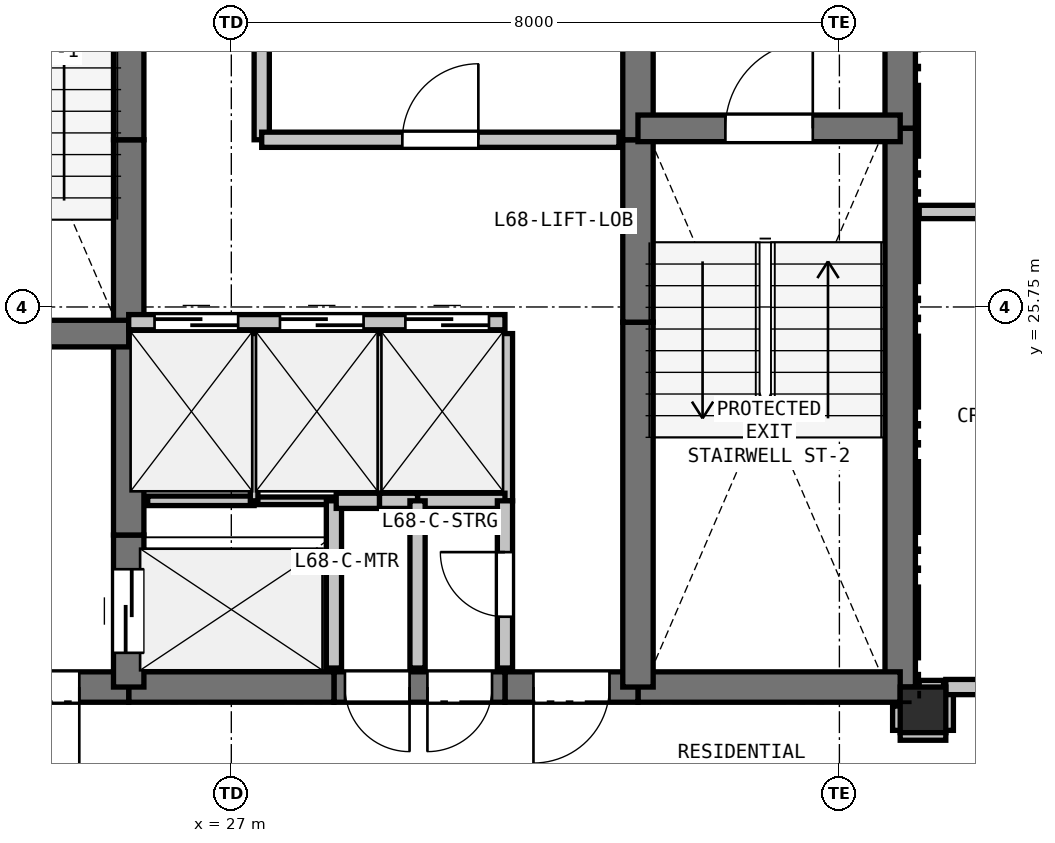
"""IFC4 building model, lengths in metres.
Left out: names, types, materials, properties, quantities, classifications, styles, units other than length and angle.
Written with IfcOpenShell. Run it as: python <this file> out.ifc"""

import sys

from ifc_helpers import new_model, si_unit, direction, frame, frame_2d, origin, origin_2d, place, context, subcontext, project, spatial, rectangle, extrude, element, fill, save


model = new_model("IFC4")
c1 = context("Model", 3, precision=1e-05, world=origin(), true_north=direction((0.0, 1.0)))
c2 = subcontext(c1, "Body", "Model", "MODEL_VIEW")
j1 = project(units=[si_unit("LENGTHUNIT", "METRE"), si_unit("PLANEANGLEUNIT", "RADIAN")], contexts=[c1])
p1 = place(None, origin())
s1 = spatial("IfcSite", under=j1, at=p1, CompositionType="ELEMENT")
p2 = place(p1, origin())
s2 = spatial("IfcBuilding", under=s1, at=p2, CompositionType="ELEMENT")
p3 = place(p2, frame((0.0, 0.0, 243.0)))
s3 = spatial("IfcBuildingStorey", under=s2, at=p3, CompositionType="ELEMENT", Elevation=243.0)
p4 = place(p3, frame((36.1, 20.45, 0.0), z_axis=(0.0, 0.0, 1.0), x_axis=(1.0, 0.0, 0.0)))
e1 = element("IfcColumn", 1, at=p4, inside=s3, PredefinedType="COLUMN", context=c2, shape_type="SweptSolid", body=[
    extrude(rectangle(XDim=0.6, YDim=0.6, at=origin_2d()), origin(), (0.0, 0.0, 1.0), 3.3),
])
p5 = place(p3, frame((35.8, 32.75, 0.0), z_axis=(0.0, 0.0, 1.0), x_axis=(0.0, -1.0, 0.0)))
e2 = element("IfcWall", 2, at=p5, inside=s3, PredefinedType="SHEAR", context=c2, shape_type="SweptSolid", body=[
    extrude(rectangle(XDim=4.65, YDim=0.4, at=frame_2d((2.325, 0.0))), origin(), (0.0, 0.0, 1.0), 3.08),
])
p6 = place(p3, frame((35.8, 28.1, 0.0), z_axis=(0.0, 0.0, 1.0), x_axis=(0.0, -1.0, 0.0)))
e3 = element("IfcWall", 3, at=p6, inside=s3, PredefinedType="SHEAR", context=c2, shape_type="SweptSolid", body=[
    extrude(rectangle(XDim=7.35, YDim=0.4, at=frame_2d((3.675, 0.0))), origin(), (0.0, 0.0, 1.0), 3.08),
])
p7 = place(p3, frame((35.8, 20.75, 0.0), z_axis=(0.0, 0.0, 1.0), x_axis=(-1.0, 0.0, 0.0)))
e4 = element("IfcWall", 4, at=p7, inside=s3, PredefinedType="SHEAR", context=c2, shape_type="SweptSolid", body=[
    extrude(rectangle(XDim=3.45, YDim=0.4, at=frame_2d((1.725, 0.0))), origin(), (0.0, 0.0, 1.0), 3.08),
])
p8 = place(p3, frame((32.35, 20.75, 0.0), z_axis=(0.0, 0.0, 1.0), x_axis=(-1.0, 0.0, 0.0)))
e5 = element("IfcWall", 5, at=p8, inside=s3, PredefinedType="SHEAR", context=c2, shape_type="SweptSolid", body=[
    extrude(rectangle(XDim=1.75, YDim=0.4, at=frame_2d((0.875, 0.0))), origin(), (0.0, 0.0, 1.0), 3.08),
])
p9 = place(p8, frame((0.375, 0.0, 0.0)))
e6 = element("IfcOpeningElement", 6, at=p9, cuts=e5, PredefinedType="OPENING", context=c2, shape_type="SweptSolid", body=[
    extrude(rectangle(XDim=1.0, YDim=2.15, at=frame_2d((0.5, 1.075))), frame((0.0, 0.21, 0.0), z_axis=(0.0, -1.0, 0.0), x_axis=(1.0, 0.0, 0.0)), (0.0, 0.0, 1.0), 0.42),
])
p10 = place(p3, frame((30.6, 20.75, 0.0), z_axis=(0.0, 0.0, 1.0), x_axis=(-1.0, 0.0, 0.0)))
e7 = element("IfcWall", 7, at=p10, inside=s3, PredefinedType="SHEAR", context=c2, shape_type="SweptSolid", body=[
    extrude(rectangle(XDim=2.25, YDim=0.4, at=frame_2d((1.125, 0.0))), origin(), (0.0, 0.0, 1.0), 3.08),
])
p11 = place(p10, frame((1.255, 0.0, 0.0)))
e8 = element("IfcOpeningElement", 8, at=p11, cuts=e7, PredefinedType="OPENING", context=c2, shape_type="SweptSolid", body=[
    extrude(rectangle(XDim=0.85, YDim=2.1, at=frame_2d((0.425, 1.05))), frame((0.0, 0.21, 0.0), z_axis=(0.0, -1.0, 0.0), x_axis=(1.0, 0.0, 0.0)), (0.0, 0.0, 1.0), 0.42),
])
p12 = place(p10, frame((0.17, 0.0, 0.0)))
e9 = element("IfcOpeningElement", 9, at=p12, cuts=e7, PredefinedType="OPENING", context=c2, shape_type="SweptSolid", body=[
    extrude(rectangle(XDim=0.85, YDim=2.1, at=frame_2d((0.425, 1.05))), frame((0.0, 0.21, 0.0), z_axis=(0.0, -1.0, 0.0), x_axis=(1.0, 0.0, 0.0)), (0.0, 0.0, 1.0), 0.42),
])
p13 = place(p3, frame((28.35, 20.75, 0.0), z_axis=(0.0, 0.0, 1.0), x_axis=(-1.0, 0.0, 0.0)))
e10 = element("IfcWall", 10, at=p13, inside=s3, PredefinedType="SHEAR", context=c2, shape_type="SweptSolid", body=[
    extrude(rectangle(XDim=2.7, YDim=0.4, at=frame_2d((1.35, 0.0))), origin(), (0.0, 0.0, 1.0), 3.08),
])
p14 = place(p3, frame((25.65, 20.75, 0.0), z_axis=(0.0, 0.0, 1.0), x_axis=(-1.0, 0.0, 0.0)))
e11 = element("IfcWall", 11, at=p14, inside=s3, PredefinedType="SHEAR", context=c2, shape_type="SweptSolid", body=[
    extrude(rectangle(XDim=3.45, YDim=0.4, at=frame_2d((1.725, 0.0))), origin(), (0.0, 0.0, 1.0), 3.08),
])
p15 = place(p14, frame((0.65, 0.0, 0.0)))
e12 = element("IfcOpeningElement", 12, at=p15, cuts=e11, PredefinedType="OPENING", context=c2, shape_type="SweptSolid", body=[
    extrude(rectangle(XDim=1.15, YDim=2.15, at=frame_2d((0.575, 1.075))), frame((0.0, 0.21, 0.0), z_axis=(0.0, -1.0, 0.0), x_axis=(1.0, 0.0, 0.0)), (0.0, 0.0, 1.0), 0.42),
])
p16 = place(p3, frame((25.65, 20.75, 0.0), z_axis=(0.0, 0.0, 1.0), x_axis=(0.0, 1.0, 0.0)))
e13 = element("IfcWall", 13, at=p16, inside=s3, PredefinedType="SHEAR", context=c2, shape_type="SweptSolid", body=[
    extrude(rectangle(XDim=2.0, YDim=0.4, at=frame_2d((1.0, 0.0))), origin(), (0.0, 0.0, 1.0), 3.08),
])
p17 = place(p16, frame((0.45, 0.0, 0.0)))
e14 = element("IfcOpeningElement", 14, at=p17, cuts=e13, PredefinedType="OPENING", context=c2, shape_type="SweptSolid", body=[
    extrude(rectangle(XDim=1.1, YDim=2.15, at=frame_2d((0.55, 1.075))), frame((0.0, 0.21, 0.0), z_axis=(0.0, -1.0, 0.0), x_axis=(1.0, 0.0, 0.0)), (0.0, 0.0, 1.0), 0.42),
])
p18 = place(p3, frame((25.65, 22.75, 0.0), z_axis=(0.0, 0.0, 1.0), x_axis=(0.0, 1.0, 0.0)))
e15 = element("IfcWall", 15, at=p18, inside=s3, PredefinedType="SHEAR", context=c2, shape_type="SweptSolid", body=[
    extrude(rectangle(XDim=2.8, YDim=0.4, at=frame_2d((1.4, 0.0))), origin(), (0.0, 0.0, 1.0), 3.08),
])
p19 = place(p3, frame((25.65, 25.55, 0.0), z_axis=(0.0, 0.0, 1.0), x_axis=(0.0, 1.0, 0.0)))
e16 = element("IfcWall", 16, at=p19, inside=s3, PredefinedType="SHEAR", context=c2, shape_type="SweptSolid", body=[
    extrude(rectangle(XDim=2.4, YDim=0.4, at=frame_2d((1.2, 0.0))), origin(), (0.0, 0.0, 1.0), 3.08),
])
for number, where, z_axis, x_axis in (
    (17, (25.65, 27.95, 0.0), (0.0, 0.0, 1.0), (0.0, 1.0, 0.0)),
    (18, (32.35, 20.75, 0.0), (0.0, 0.0, 1.0), (0.0, 1.0, 0.0)),
):
    element("IfcWall", number, at=place(p3, frame(where, z_axis=z_axis, x_axis=x_axis)), inside=s3, PredefinedType="SHEAR", context=c2, shape_type="SweptSolid", body=[
        extrude(rectangle(XDim=4.8, YDim=0.4, at=frame_2d((2.4, 0.0))), origin(), (0.0, 0.0, 1.0), 3.08),
    ])
p20 = place(p3, frame((32.35, 25.55, 0.0), z_axis=(0.0, 0.0, 1.0), x_axis=(0.0, 1.0, 0.0)))
e19 = element("IfcWall", 19, at=p20, inside=s3, PredefinedType="SHEAR", context=c2, shape_type="SweptSolid", body=[
    extrude(rectangle(XDim=2.4, YDim=0.4, at=frame_2d((1.2, 0.0))), origin(), (0.0, 0.0, 1.0), 3.08),
])
p21 = place(p3, frame((32.35, 27.95, 0.0), z_axis=(0.0, 0.0, 1.0), x_axis=(0.0, 1.0, 0.0)))
e20 = element("IfcWall", 20, at=p21, inside=s3, PredefinedType="SHEAR", context=c2, shape_type="SweptSolid", body=[
    extrude(rectangle(XDim=2.8, YDim=0.4, at=frame_2d((1.4, 0.0))), origin(), (0.0, 0.0, 1.0), 3.08),
])
p22 = place(p3, frame((22.2, 25.4, 0.0), z_axis=(0.0, 0.0, 1.0), x_axis=(1.0, 0.0, 0.0)))
e21 = element("IfcWall", 21, at=p22, inside=s3, PredefinedType="SHEAR", context=c2, shape_type="SweptSolid", body=[
    extrude(rectangle(XDim=3.45, YDim=0.35, at=frame_2d((1.725, 0.0))), origin(), (0.0, 0.0, 1.0), 3.08),
])
p23 = place(p22, frame((1.15, 0.0, 0.0)))
e22 = element("IfcOpeningElement", 22, at=p23, cuts=e21, PredefinedType="OPENING", context=c2, shape_type="SweptSolid", body=[
    extrude(rectangle(XDim=1.15, YDim=2.15, at=frame_2d((0.575, 1.075))), frame((0.0, 0.185, 0.0), z_axis=(0.0, -1.0, 0.0), x_axis=(1.0, 0.0, 0.0)), (0.0, 0.0, 1.0), 0.37),
])
p24 = place(p3, frame((32.35, 28.1, 0.0), z_axis=(0.0, 0.0, 1.0), x_axis=(1.0, 0.0, 0.0)))
e23 = element("IfcWall", 23, at=p24, inside=s3, PredefinedType="SHEAR", context=c2, shape_type="SweptSolid", body=[
    extrude(rectangle(XDim=3.45, YDim=0.35, at=frame_2d((1.725, 0.0))), origin(), (0.0, 0.0, 1.0), 3.08),
])
p25 = place(p24, frame((1.15, 0.0, 0.0)))
e24 = element("IfcOpeningElement", 24, at=p25, cuts=e23, PredefinedType="OPENING", context=c2, shape_type="SweptSolid", body=[
    extrude(rectangle(XDim=1.15, YDim=2.15, at=frame_2d((0.575, 1.075))), frame((0.0, 0.185, 0.0), z_axis=(0.0, -1.0, 0.0), x_axis=(1.0, 0.0, 0.0)), (0.0, 0.0, 1.0), 0.37),
])
p26 = place(p3, frame((25.65, 25.55, 0.0), z_axis=(0.0, 0.0, 1.0), x_axis=(1.0, 0.0, 0.0)))
e25 = element("IfcWall", 25, at=p26, inside=s3, PredefinedType="PARTITIONING", context=c2, shape_type="SweptSolid", body=[
    extrude(rectangle(XDim=4.95, YDim=0.2, at=frame_2d((2.475, 0.0))), origin(), (0.0, 0.0, 1.0), 3.08),
])
p27 = place(p26, frame((0.34, 0.0, 0.0)))
e26 = element("IfcOpeningElement", 26, at=p27, cuts=e25, PredefinedType="OPENING", context=c2, shape_type="SweptSolid", body=[
    extrude(rectangle(XDim=1.1, YDim=2.15, at=frame_2d((0.55, 1.075))), frame((0.0, 0.11, 0.0), z_axis=(0.0, -1.0, 0.0), x_axis=(1.0, 0.0, 0.0)), (0.0, 0.0, 1.0), 0.22),
])
p28 = place(p26, frame((1.99, 0.0, 0.0)))
e27 = element("IfcOpeningElement", 27, at=p28, cuts=e25, PredefinedType="OPENING", context=c2, shape_type="SweptSolid", body=[
    extrude(rectangle(XDim=1.1, YDim=2.15, at=frame_2d((0.55, 1.075))), frame((0.0, 0.11, 0.0), z_axis=(0.0, -1.0, 0.0), x_axis=(1.0, 0.0, 0.0)), (0.0, 0.0, 1.0), 0.22),
])
p29 = place(p26, frame((3.64, 0.0, 0.0)))
e28 = element("IfcOpeningElement", 28, at=p29, cuts=e25, PredefinedType="OPENING", context=c2, shape_type="SweptSolid", body=[
    extrude(rectangle(XDim=1.1, YDim=2.15, at=frame_2d((0.55, 1.075))), frame((0.0, 0.11, 0.0), z_axis=(0.0, -1.0, 0.0), x_axis=(1.0, 0.0, 0.0)), (0.0, 0.0, 1.0), 0.22),
])
p30 = place(p3, frame((25.9, 23.2, 0.0), z_axis=(0.0, 0.0, 1.0), x_axis=(1.0, 0.0, 0.0)))
e29 = element("IfcWall", 29, at=p30, inside=s3, PredefinedType="PARTITIONING", context=c2, shape_type="SweptSolid", body=[
    extrude(rectangle(XDim=1.4, YDim=0.125, at=frame_2d((0.7, 0.0))), origin(), (0.0, 0.0, 1.0), 3.08),
])
p31 = place(p3, frame((27.3, 23.2, 0.0), z_axis=(0.0, 0.0, 1.0), x_axis=(1.0, 0.0, 0.0)))
e30 = element("IfcWall", 30, at=p31, inside=s3, PredefinedType="PARTITIONING", context=c2, shape_type="SweptSolid", body=[
    extrude(rectangle(XDim=1.05, YDim=0.1, at=frame_2d((0.525, 0.0))), origin(), (0.0, 0.0, 1.0), 3.08),
])
p32 = place(p3, frame((28.35, 23.2, 0.0), z_axis=(0.0, 0.0, 1.0), x_axis=(0.0, -1.0, 0.0)))
e31 = element("IfcWall", 31, at=p32, inside=s3, PredefinedType="PARTITIONING", context=c2, shape_type="SweptSolid", body=[
    extrude(rectangle(XDim=2.2, YDim=0.2, at=frame_2d((1.1, 0.0))), origin(), (0.0, 0.0, 1.0), 3.08),
])
p33 = place(p3, frame((27.3, 25.4, 0.0), z_axis=(0.0, 0.0, 1.0), x_axis=(0.0, -1.0, 0.0)))
e32 = element("IfcWall", 32, at=p33, inside=s3, PredefinedType="PARTITIONING", context=c2, shape_type="SweptSolid", body=[
    extrude(rectangle(XDim=2.2, YDim=0.1, at=frame_2d((1.1, 0.0))), origin(), (0.0, 0.0, 1.0), 3.08),
])
p34 = place(p3, frame((28.95, 25.4, 0.0), z_axis=(0.0, 0.0, 1.0), x_axis=(0.0, -1.0, 0.0)))
e33 = element("IfcWall", 33, at=p34, inside=s3, PredefinedType="PARTITIONING", context=c2, shape_type="SweptSolid", body=[
    extrude(rectangle(XDim=2.2, YDim=0.125, at=frame_2d((1.1, 0.0))), origin(), (0.0, 0.0, 1.0), 3.08),
])
p35 = place(p3, frame((28.95, 23.2, 0.0), z_axis=(0.0, 0.0, 1.0), x_axis=(-1.0, 0.0, 0.0)))
e34 = element("IfcWall", 34, at=p35, inside=s3, PredefinedType="PARTITIONING", context=c2, shape_type="SweptSolid", body=[
    extrude(rectangle(XDim=0.57, YDim=0.2, at=frame_2d((0.285, 0.0))), origin(), (0.0, 0.0, 1.0), 3.08),
])
p36 = place(p3, frame((30.6, 25.4, 0.0), z_axis=(0.0, 0.0, 1.0), x_axis=(0.0, -1.0, 0.0)))
e35 = element("IfcWall", 35, at=p36, inside=s3, PredefinedType="PARTITIONING", context=c2, shape_type="SweptSolid", body=[
    extrude(rectangle(XDim=2.2, YDim=0.2, at=frame_2d((1.1, 0.0))), origin(), (0.0, 0.0, 1.0), 3.08),
])
p37 = place(p3, frame((30.6, 23.2, 0.0), z_axis=(0.0, 0.0, 1.0), x_axis=(-1.0, 0.0, 0.0)))
e36 = element("IfcWall", 36, at=p37, inside=s3, PredefinedType="PARTITIONING", context=c2, shape_type="SweptSolid", body=[
    extrude(rectangle(XDim=1.15, YDim=0.2, at=frame_2d((0.575, 0.0))), origin(), (0.0, 0.0, 1.0), 3.08),
])
p38 = place(p3, frame((29.45, 23.2, 0.0), z_axis=(0.0, 0.0, 1.0), x_axis=(-1.0, 0.0, 0.0)))
e37 = element("IfcWall", 37, at=p38, inside=s3, PredefinedType="PARTITIONING", context=c2, shape_type="SweptSolid", body=[
    extrude(rectangle(XDim=0.5, YDim=0.2, at=frame_2d((0.25, 0.0))), origin(), (0.0, 0.0, 1.0), 3.08),
])
p39 = place(p3, frame((30.6, 21.0, 0.0), z_axis=(0.0, 0.0, 1.0), x_axis=(0.0, 1.0, 0.0)))
e38 = element("IfcWall", 38, at=p39, inside=s3, PredefinedType="PARTITIONING", context=c2, shape_type="SweptSolid", body=[
    extrude(rectangle(XDim=2.2, YDim=0.2, at=frame_2d((1.1, 0.0))), origin(), (0.0, 0.0, 1.0), 3.08),
])
p40 = place(p39, frame((0.675, 0.0, 0.0)))
e39 = element("IfcOpeningElement", 39, at=p40, cuts=e38, PredefinedType="OPENING", context=c2, shape_type="SweptSolid", body=[
    extrude(rectangle(XDim=0.85, YDim=2.1, at=frame_2d((0.425, 1.05))), frame((0.0, 0.11, 0.0), z_axis=(0.0, -1.0, 0.0), x_axis=(1.0, 0.0, 0.0)), (0.0, 0.0, 1.0), 0.22),
])
p41 = place(p3, frame((27.4, 30.3, 0.0), z_axis=(0.0, 0.0, 1.0), x_axis=(0.0, -1.0, 0.0)))
e40 = element("IfcWall", 40, at=p41, inside=s3, PredefinedType="PARTITIONING", context=c2, shape_type="SweptSolid", body=[
    extrude(rectangle(XDim=2.35, YDim=0.2, at=frame_2d((1.175, 0.0))), origin(), (0.0, 0.0, 1.0), 3.08),
])
p42 = place(p3, frame((27.4, 27.95, 0.0), z_axis=(0.0, 0.0, 1.0), x_axis=(1.0, 0.0, 0.0)))
e41 = element("IfcWall", 41, at=p42, inside=s3, PredefinedType="PARTITIONING", context=c2, shape_type="SweptSolid", body=[
    extrude(rectangle(XDim=4.7, YDim=0.2, at=frame_2d((2.35, 0.0))), origin(), (0.0, 0.0, 1.0), 3.08),
])
p43 = place(p42, frame((1.85, 0.0, 0.0)))
e42 = element("IfcOpeningElement", 42, at=p43, cuts=e41, PredefinedType="OPENING", context=c2, shape_type="SweptSolid", body=[
    extrude(rectangle(XDim=1.0, YDim=2.15, at=frame_2d((0.5, 1.075))), frame((0.0, 0.11, 0.0), z_axis=(0.0, -1.0, 0.0), x_axis=(1.0, 0.0, 0.0)), (0.0, 0.0, 1.0), 0.22),
])
p44 = place(p3, frame((35.8, 20.15, 0.0), z_axis=(0.0, 0.0, 1.0), x_axis=(1.0, 0.0, 0.0)))
e43 = element("IfcWall", 43, at=p44, inside=s3, PredefinedType="PARTITIONING", context=c2, shape_type="SweptSolid", body=[
    extrude(rectangle(XDim=0.6, YDim=0.2, at=frame_2d((0.3, 0.0))), origin(), (0.0, 0.0, 1.0), 2.528),
])
p45 = place(p3, frame((36.4, 20.18, 0.0), z_axis=(0.0, 0.0, 1.0), x_axis=(0.0, 1.0, 0.0)))
e44 = element("IfcWall", 44, at=p45, inside=s3, PredefinedType="PARTITIONING", context=c2, shape_type="SweptSolid", body=[
    extrude(rectangle(XDim=0.57, YDim=0.2, at=frame_2d((0.285, 0.0))), origin(), (0.0, 0.0, 1.0), 3.08),
])
p46 = place(p3, frame((36.4, 20.75, 0.0), z_axis=(0.0, 0.0, 1.0), x_axis=(1.0, 0.0, 0.0)))
e45 = element("IfcWall", 45, at=p46, inside=s3, PredefinedType="PARTITIONING", context=c2, shape_type="SweptSolid", body=[
    extrude(rectangle(XDim=1.8, YDim=0.2, at=frame_2d((0.9, 0.0))), origin(), (0.0, 0.0, 1.0), 3.08),
])
p47 = place(p46, frame((0.475, 0.0, 0.0)))
e46 = element("IfcOpeningElement", 46, at=p47, cuts=e45, PredefinedType="OPENING", context=c2, shape_type="SweptSolid", body=[
    extrude(rectangle(XDim=0.85, YDim=2.1, at=frame_2d((0.425, 1.05))), frame((0.0, 0.11, 0.0), z_axis=(0.0, -1.0, 0.0), x_axis=(1.0, 0.0, 0.0)), (0.0, 0.0, 1.0), 0.22),
])
p48 = place(p3, frame((35.8, 20.5, 0.0), z_axis=(0.0, 0.0, 1.0), x_axis=(0.0, -1.0, 0.0)))
e47 = element("IfcWall", 47, at=p48, inside=s3, PredefinedType="PARTITIONING", context=c2, shape_type="SweptSolid", body=[
    extrude(rectangle(XDim=0.32, YDim=0.2, at=frame_2d((0.16, 0.0))), origin(), (0.0, 0.0, 1.0), 2.605),
])
p49 = place(p3, frame((39.703, 27.0, 0.0), z_axis=(0.0, 0.0, 1.0), x_axis=(-1.0, 0.0, 0.0)))
e48 = element("IfcWall", 48, at=p49, inside=s3, PredefinedType="PLUMBINGWALL", context=c2, shape_type="SweptSolid", body=[
    extrude(rectangle(XDim=3.653, YDim=0.175, at=frame_2d((1.826, 0.0))), origin(), (0.0, 0.0, 1.0), 2.365),
])
p50 = place(p3, frame((36.37, 20.75, 0.0), z_axis=(0.0, 0.0, 1.0), x_axis=(-1.0, 0.0, 0.0)))
e49 = element("IfcWall", 49, at=p50, inside=s3, PredefinedType="PLUMBINGWALL", context=c2, shape_type="SweptSolid", body=[
    extrude(rectangle(XDim=0.32, YDim=0.175, at=frame_2d((0.16, 0.0))), origin(), (0.0, 0.0, 1.0), 2.605),
])
p51 = place(p3, frame((29.45, 23.2, 0.0), z_axis=(0.0, 0.0, 1.0), x_axis=(0.0, -1.0, 0.0)))
e50 = element("IfcWall", 50, at=p51, inside=s3, PredefinedType="PARTITIONING", context=c2, shape_type="SweptSolid", body=[
    extrude(rectangle(XDim=2.2, YDim=0.2, at=frame_2d((1.1, 0.0))), origin(), (0.0, 0.0, 1.0), 3.08),
])
p52 = place(p27, origin())
e51 = element("IfcDoor", 51, at=p52, inside=s3, OperationType="SLIDING_TO_LEFT", PredefinedType="DOOR", context=c2, shape_type="SweptSolid", body=[
    extrude(rectangle(XDim=1.1, YDim=2.15, at=frame_2d((0.55, 1.075))), frame((0.0, 0.025, 0.0), z_axis=(0.0, -1.0, 0.0), x_axis=(1.0, 0.0, 0.0)), (0.0, 0.0, 1.0), 0.05),
])
fill(e26, e51)
p53 = place(p28, origin())
e52 = element("IfcDoor", 52, at=p53, inside=s3, OperationType="SLIDING_TO_LEFT", PredefinedType="DOOR", context=c2, shape_type="SweptSolid", body=[
    extrude(rectangle(XDim=1.1, YDim=2.15, at=frame_2d((0.55, 1.075))), frame((0.0, 0.025, 0.0), z_axis=(0.0, -1.0, 0.0), x_axis=(1.0, 0.0, 0.0)), (0.0, 0.0, 1.0), 0.05),
])
fill(e27, e52)
p54 = place(p29, origin())
e53 = element("IfcDoor", 53, at=p54, inside=s3, OperationType="SLIDING_TO_LEFT", PredefinedType="DOOR", context=c2, shape_type="SweptSolid", body=[
    extrude(rectangle(XDim=1.1, YDim=2.15, at=frame_2d((0.55, 1.075))), frame((0.0, 0.025, 0.0), z_axis=(0.0, -1.0, 0.0), x_axis=(1.0, 0.0, 0.0)), (0.0, 0.0, 1.0), 0.05),
])
fill(e28, e53)
p55 = place(p9, origin())
e54 = element("IfcDoor", 54, at=p55, inside=s3, OperationType="SINGLE_SWING_RIGHT", PredefinedType="DOOR", context=c2, shape_type="SweptSolid", body=[
    extrude(rectangle(XDim=1.0, YDim=2.15, at=frame_2d((0.5, 1.075))), frame((0.0, 0.025, 0.0), z_axis=(0.0, -1.0, 0.0), x_axis=(1.0, 0.0, 0.0)), (0.0, 0.0, 1.0), 0.05),
])
fill(e6, e54)
p56 = place(p17, origin())
e55 = element("IfcDoor", 55, at=p56, inside=s3, OperationType="SLIDING_TO_LEFT", PredefinedType="DOOR", context=c2, shape_type="SweptSolid", body=[
    extrude(rectangle(XDim=1.1, YDim=2.15, at=frame_2d((0.55, 1.075))), frame((0.0, 0.025, 0.0), z_axis=(0.0, -1.0, 0.0), x_axis=(1.0, 0.0, 0.0)), (0.0, 0.0, 1.0), 0.05),
])
fill(e14, e55)
p57 = place(p25, origin())
e56 = element("IfcDoor", 56, at=p57, inside=s3, OperationType="SINGLE_SWING_RIGHT", PredefinedType="DOOR", context=c2, shape_type="SweptSolid", body=[
    extrude(rectangle(XDim=1.15, YDim=2.15, at=frame_2d((0.575, 1.075))), frame((0.0, 0.025, 0.0), z_axis=(0.0, -1.0, 0.0), x_axis=(1.0, 0.0, 0.0)), (0.0, 0.0, 1.0), 0.05),
])
fill(e24, e56)
p58 = place(p15, origin())
e57 = element("IfcDoor", 57, at=p58, inside=s3, OperationType="SINGLE_SWING_LEFT", PredefinedType="DOOR", context=c2, shape_type="SweptSolid", body=[
    extrude(rectangle(XDim=1.15, YDim=2.15, at=frame_2d((0.575, 1.075))), frame((0.0, 0.025, 0.0), z_axis=(0.0, -1.0, 0.0), x_axis=(1.0, 0.0, 0.0)), (0.0, 0.0, 1.0), 0.05),
])
fill(e12, e57)
p59 = place(p43, origin())
e58 = element("IfcDoor", 58, at=p59, inside=s3, OperationType="SINGLE_SWING_RIGHT", PredefinedType="DOOR", context=c2, shape_type="SweptSolid", body=[
    extrude(rectangle(XDim=1.0, YDim=2.15, at=frame_2d((0.5, 1.075))), frame((0.0, 0.025, 0.0), z_axis=(0.0, -1.0, 0.0), x_axis=(1.0, 0.0, 0.0)), (0.0, 0.0, 1.0), 0.05),
])
fill(e42, e58)
p60 = place(p40, origin())
e59 = element("IfcDoor", 59, at=p60, inside=s3, OperationType="SINGLE_SWING_RIGHT", PredefinedType="DOOR", context=c2, shape_type="SweptSolid", body=[
    extrude(rectangle(XDim=0.85, YDim=2.1, at=frame_2d((0.425, 1.05))), frame((0.0, 0.025, 0.0), z_axis=(0.0, -1.0, 0.0), x_axis=(1.0, 0.0, 0.0)), (0.0, 0.0, 1.0), 0.05),
])
fill(e39, e59)
p61 = place(p11, origin())
e60 = element("IfcDoor", 60, at=p61, inside=s3, OperationType="SINGLE_SWING_LEFT", PredefinedType="DOOR", context=c2, shape_type="SweptSolid", body=[
    extrude(rectangle(XDim=0.85, YDim=2.1, at=frame_2d((0.425, 1.05))), frame((0.0, 0.025, 0.0), z_axis=(0.0, -1.0, 0.0), x_axis=(1.0, 0.0, 0.0)), (0.0, 0.0, 1.0), 0.05),
])
fill(e8, e60)
p62 = place(p12, origin())
e61 = element("IfcDoor", 61, at=p62, inside=s3, OperationType="SINGLE_SWING_RIGHT", PredefinedType="DOOR", context=c2, shape_type="SweptSolid", body=[
    extrude(rectangle(XDim=0.85, YDim=2.1, at=frame_2d((0.425, 1.05))), frame((0.0, 0.025, 0.0), z_axis=(0.0, -1.0, 0.0), x_axis=(1.0, 0.0, 0.0)), (0.0, 0.0, 1.0), 0.05),
])
fill(e9, e61)
save(model, sys.argv[1])
